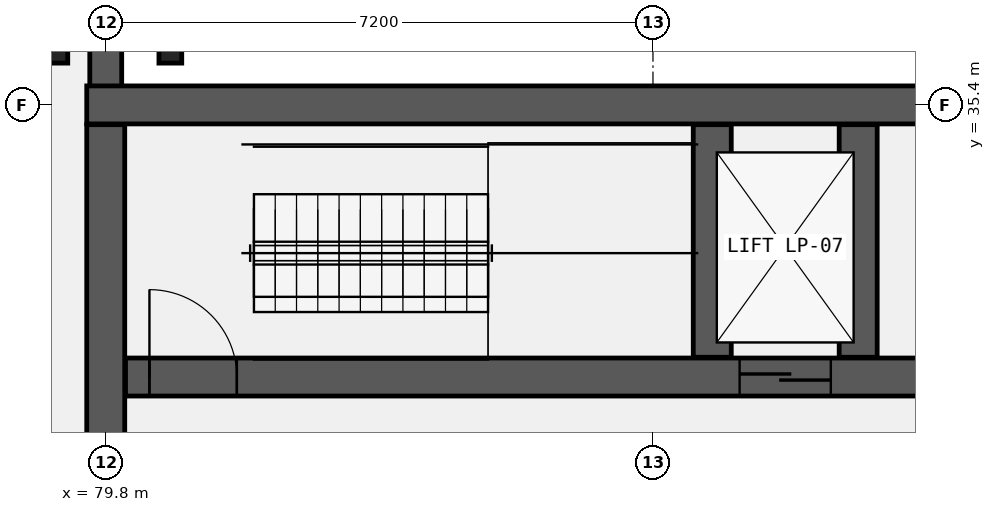
"""IFC4 building model, lengths in metres.
Left out: names, types, materials, properties, quantities, classifications, styles, units other than length and angle.
Written with IfcOpenShell. Run it as: python <this file> out.ifc"""

import sys

from ifc_helpers import new_model, si_unit, direction, frame, frame_2d, origin, origin_2d, place, context, subcontext, project, spatial, rectangle, i_section, extrude, element, fill, save


model = new_model("IFC4")
c1 = context("Model", 3, precision=1e-05, world=origin(), true_north=direction((0.0, 1.0)))
c2 = subcontext(c1, "Body", "Model", "MODEL_VIEW")
j1 = project(units=[si_unit("LENGTHUNIT", "METRE"), si_unit("PLANEANGLEUNIT", "RADIAN")], contexts=[c1])
p1 = place(None, origin())
s1 = spatial("IfcSite", under=j1, at=p1, CompositionType="ELEMENT")
p2 = place(p1, origin())
s2 = spatial("IfcBuilding", under=s1, at=p2, CompositionType="ELEMENT")
p3 = place(p2, frame((0.0, 0.0, -4.2)))
s3 = spatial("IfcBuildingStorey", under=s2, at=p3, CompositionType="ELEMENT", Elevation=-4.2)
p4 = place(p3, frame((79.8, 78.4, 0.0), z_axis=(0.0, 0.0, 1.0), x_axis=(0.0, -1.0, 0.0)))
e1 = element("IfcWall", 1, at=p4, inside=s3, PredefinedType="USERDEFINED", context=c2, shape_type="SweptSolid", body=[
    extrude(rectangle(XDim=42.77, YDim=0.42, at=frame_2d((21.385, 0.0))), origin(), (0.0, 0.0, 1.0), 3.88),
])
p5 = place(p3, frame((79.55, 35.4, 0.0), z_axis=(0.0, 0.0, 1.0), x_axis=(1.0, 0.0, 0.0)))
e2 = element("IfcWall", 2, at=p5, inside=s3, PredefinedType="SHEAR", context=c2, shape_type="SweptSolid", body=[
    extrude(rectangle(XDim=14.9, YDim=0.5, at=frame_2d((7.45, 0.0))), origin(), (0.0, 0.0, 1.0), 4.2),
])
p6 = place(p3, frame((79.8, 28.46, 0.0), z_axis=(0.0, 0.0, 1.0), x_axis=(0.0, 1.0, 0.0)))
e3 = element("IfcWall", 3, at=p6, inside=s3, PredefinedType="SHEAR", context=c2, shape_type="SweptSolid", body=[
    extrude(rectangle(XDim=6.68, YDim=0.5, at=frame_2d((3.34, 0.0))), origin(), (0.0, 0.0, 1.0), 4.2),
])
p7 = place(p3, frame((80.06, 31.82, 0.0), z_axis=(0.0, 0.0, 1.0), x_axis=(1.0, 0.0, 0.0)))
e4 = element("IfcWall", 4, at=p7, inside=s3, PredefinedType="SHEAR", context=c2, shape_type="SweptSolid", body=[
    extrude(rectangle(XDim=13.88, YDim=0.5, at=frame_2d((6.94, 0.0))), origin(), (0.0, 0.0, 1.0), 4.2),
])
p8 = place(p7, frame((8.08, 0.0, 0.0)))
e5 = element("IfcOpeningElement", 5, at=p8, cuts=e4, PredefinedType="OPENING", context=c2, shape_type="SweptSolid", body=[
    extrude(rectangle(XDim=1.2, YDim=2.15, at=frame_2d((0.6, 1.075))), frame((0.0, 0.26, 0.0), z_axis=(0.0, -1.0, 0.0), x_axis=(1.0, 0.0, 0.0)), (0.0, 0.0, 1.0), 0.52),
])
p9 = place(p7, frame((0.315, 0.0, 0.0)))
e6 = element("IfcOpeningElement", 6, at=p9, cuts=e4, PredefinedType="OPENING", context=c2, shape_type="SweptSolid", body=[
    extrude(rectangle(XDim=1.15, YDim=2.15, at=frame_2d((0.575, 1.075))), frame((0.0, 0.26, 0.0), z_axis=(0.0, -1.0, 0.0), x_axis=(1.0, 0.0, 0.0)), (0.0, 0.0, 1.0), 0.52),
])
for number, where, z_axis, x_axis in (
    (7, (87.78, 32.08, 0.0), (0.0, 0.0, 1.0), (0.0, 1.0, 0.0)),
    (8, (89.7, 32.08, 0.0), (0.0, 0.0, 1.0), (0.0, 1.0, 0.0)),
):
    element("IfcWall", number, at=place(p3, frame(where, z_axis=z_axis, x_axis=x_axis)), inside=s3, PredefinedType="SHEAR", context=c2, shape_type="SweptSolid", body=[
        extrude(rectangle(XDim=3.06, YDim=0.5, at=frame_2d((1.53, 0.0))), origin(), (0.0, 0.0, 1.0), 4.2),
    ])
for number, where, z_axis, x_axis in (
    (9, (79.15, 36.1, 0.0), (0.0, 0.0, 1.0), (1.0, 0.0, 0.0)),
    (10, (80.65, 36.1, 0.0), (0.0, 0.0, 1.0), (1.0, 0.0, 0.0)),
):
    element("IfcColumn", number, at=place(p3, frame(where, z_axis=z_axis, x_axis=x_axis)), inside=s3, PredefinedType="COLUMN", context=c2, shape_type="SweptSolid", body=[
        extrude(i_section(OverallWidth=0.3, OverallDepth=0.3, WebThickness=0.011, FlangeThickness=0.019, FilletRadius=0.027, at=origin_2d()), origin(), (0.0, 0.0, 1.0), 4.2),
    ])
p10 = place(p8, frame((1.2, 0.0, 0.0), z_axis=(0.0, 0.0, 1.0), x_axis=(-1.0, 0.0, 0.0)))
e11 = element("IfcDoor", 11, at=p10, inside=s3, OperationType="DOUBLE_DOOR_SLIDING", PredefinedType="DOOR", context=c2, shape_type="SweptSolid", body=[
    extrude(rectangle(XDim=1.2, YDim=2.15, at=frame_2d((0.6, 1.075))), frame((0.0, 0.025, 0.0), z_axis=(0.0, -1.0, 0.0), x_axis=(1.0, 0.0, 0.0)), (0.0, 0.0, 1.0), 0.05),
])
fill(e5, e11)
p11 = place(p9, origin())
e12 = element("IfcDoor", 12, at=p11, inside=s3, OperationType="SINGLE_SWING_LEFT", PredefinedType="DOOR", context=c2, shape_type="SweptSolid", body=[
    extrude(rectangle(XDim=1.15, YDim=2.15, at=frame_2d((0.575, 1.075))), frame((0.0, 0.025, 0.0), z_axis=(0.0, -1.0, 0.0), x_axis=(1.0, 0.0, 0.0)), (0.0, 0.0, 1.0), 0.05),
])
fill(e6, e12)
save(model, sys.argv[1])
